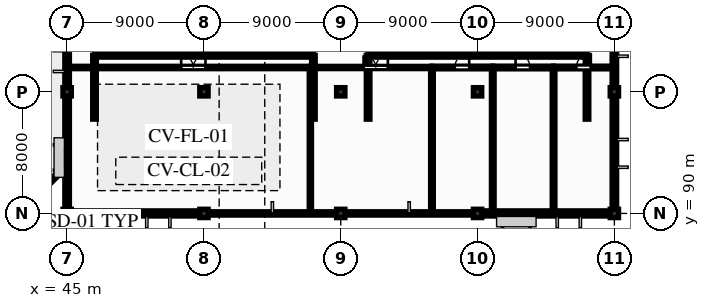
"""IFC4 building model, lengths in metres.
Left out: names, types, materials, properties, quantities, classifications, styles, units other than length and angle.
Written with IfcOpenShell. Run it as: python <this file> out.ifc"""

import sys

from ifc_helpers import new_model, si_unit, direction, frame, frame_2d, origin, origin_2d, place, context, subcontext, project, spatial, polyline, rectangle, outline, extrude, element, fill, save


model = new_model("IFC4")
c1 = context("Model", 3, precision=1e-05, world=origin(), true_north=direction((0.0, 1.0)))
c2 = subcontext(c1, "Body", "Model", "MODEL_VIEW")
j1 = project(units=[si_unit("LENGTHUNIT", "METRE"), si_unit("PLANEANGLEUNIT", "RADIAN")], contexts=[c1])
p1 = place(None, origin())
s1 = spatial("IfcSite", under=j1, at=p1, CompositionType="ELEMENT")
p2 = place(p1, origin())
s2 = spatial("IfcBuilding", under=s1, at=p2, CompositionType="ELEMENT")
p3 = place(p2, frame((0.0, 0.0, 20.26)))
s3 = spatial("IfcBuildingStorey", under=s2, at=p3, CompositionType="ELEMENT", Elevation=20.26)
for number, where, z_axis, x_axis in (
    (1, (45.0, 90.0, 0.0), (0.0, 0.0, 1.0), (1.0, 0.0, 0.0)),
    (2, (45.0, 98.0, 0.0), (0.0, 0.0, 1.0), (1.0, 0.0, 0.0)),
    (3, (54.0, 90.0, 0.0), (0.0, 0.0, 1.0), (1.0, 0.0, 0.0)),
    (4, (54.0, 98.0, 0.0), (0.0, 0.0, 1.0), (1.0, 0.0, 0.0)),
    (5, (63.0, 90.0, 0.0), (0.0, 0.0, 1.0), (1.0, 0.0, 0.0)),
    (6, (63.0, 98.0, 0.0), (0.0, 0.0, 1.0), (1.0, 0.0, 0.0)),
    (7, (72.0, 90.0, 0.0), (0.0, 0.0, 1.0), (1.0, 0.0, 0.0)),
    (8, (72.0, 98.0, 0.0), (0.0, 0.0, 1.0), (1.0, 0.0, 0.0)),
    (9, (81.0, 90.0, 0.0), (0.0, 0.0, 1.0), (1.0, 0.0, 0.0)),
    (10, (81.0, 98.0, 0.0), (0.0, 0.0, 1.0), (1.0, 0.0, 0.0)),
):
    element("IfcColumn", number, at=place(p3, frame(where, z_axis=z_axis, x_axis=x_axis)), inside=s3, PredefinedType="COLUMN", context=c2, shape_type="SweptSolid", body=[
        extrude(rectangle(XDim=0.55, YDim=0.55, at=origin_2d()), origin(), (0.0, 0.0, 1.0), 3.64),
    ])
p4 = place(p3, frame((45.0, 90.0, 0.0), z_axis=(0.0, 0.0, 1.0), x_axis=(1.0, 0.0, 0.0)))
e11 = element("IfcWall", 11, at=p4, inside=s3, PredefinedType="SOLIDWALL", context=c2, shape_type="SweptSolid", body=[
    extrude(rectangle(XDim=9.0, YDim=0.34, at=frame_2d((4.5, 0.0))), origin(), (0.0, 0.0, 1.0), 3.39),
])
p5 = place(p4, frame((1.8, 0.0, 0.545)))
e12 = element("IfcOpeningElement", 12, at=p5, cuts=e11, PredefinedType="OPENING", context=c2, shape_type="SweptSolid", body=[
    extrude(rectangle(XDim=1.5, YDim=2.1, at=frame_2d((0.75, 1.05))), frame((0.0, 0.18, 0.0), z_axis=(0.0, -1.0, 0.0), x_axis=(1.0, 0.0, 0.0)), (0.0, 0.0, 1.0), 0.36),
])
p6 = place(p4, frame((5.4, 0.0, 0.545)))
e13 = element("IfcOpeningElement", 13, at=p6, cuts=e11, PredefinedType="OPENING", context=c2, shape_type="SweptSolid", body=[
    extrude(rectangle(XDim=1.2, YDim=2.1, at=frame_2d((0.6, 1.05))), frame((0.0, 0.18, 0.0), z_axis=(0.0, -1.0, 0.0), x_axis=(1.0, 0.0, 0.0)), (0.0, 0.0, 1.0), 0.36),
])
p7 = place(p3, frame((72.0, 90.0, 0.0), z_axis=(0.0, 0.0, 1.0), x_axis=(1.0, 0.0, 0.0)))
e14 = element("IfcWall", 14, at=p7, inside=s3, PredefinedType="SOLIDWALL", context=c2, shape_type="SweptSolid", body=[
    extrude(rectangle(XDim=9.0, YDim=0.34, at=frame_2d((4.5, 0.0))), origin(), (0.0, 0.0, 1.0), 3.39),
])
p8 = place(p7, frame((1.8, 0.0, 0.545)))
e15 = element("IfcOpeningElement", 15, at=p8, cuts=e14, PredefinedType="OPENING", context=c2, shape_type="SweptSolid", body=[
    extrude(rectangle(XDim=1.5, YDim=2.1, at=frame_2d((0.75, 1.05))), frame((0.0, 0.18, 0.0), z_axis=(0.0, -1.0, 0.0), x_axis=(1.0, 0.0, 0.0)), (0.0, 0.0, 1.0), 0.36),
])
p9 = place(p7, frame((5.4, 0.0, 0.545)))
e16 = element("IfcOpeningElement", 16, at=p9, cuts=e14, PredefinedType="OPENING", context=c2, shape_type="SweptSolid", body=[
    extrude(rectangle(XDim=1.2, YDim=2.1, at=frame_2d((0.6, 1.05))), frame((0.0, 0.18, 0.0), z_axis=(0.0, -1.0, 0.0), x_axis=(1.0, 0.0, 0.0)), (0.0, 0.0, 1.0), 0.36),
])
p10 = place(p3, frame((45.0, 90.0, 0.0), z_axis=(0.0, 0.0, 1.0), x_axis=(0.0, 1.0, 0.0)))
e17 = element("IfcWall", 17, at=p10, inside=s3, PredefinedType="SOLIDWALL", context=c2, shape_type="SweptSolid", body=[
    extrude(rectangle(XDim=24.0, YDim=0.3, at=frame_2d((12.0, 0.0))), origin(), (0.0, 0.0, 1.0), 2.585),
])
p11 = place(p10, frame((3.0, 0.0, 0.615)))
e18 = element("IfcOpeningElement", 18, at=p11, cuts=e17, PredefinedType="OPENING", context=c2, shape_type="SweptSolid", body=[
    extrude(rectangle(XDim=1.35, YDim=1.85, at=frame_2d((0.675, 0.925))), frame((0.0, 0.16, 0.0), z_axis=(0.0, -1.0, 0.0), x_axis=(1.0, 0.0, 0.0)), (0.0, 0.0, 1.0), 0.32),
])
p12 = place(p10, frame((11.7, 0.0, 0.715)))
e19 = element("IfcOpeningElement", 19, at=p12, cuts=e17, PredefinedType="OPENING", context=c2, shape_type="SweptSolid", body=[
    extrude(rectangle(XDim=1.05, YDim=1.75, at=frame_2d((0.525, 0.875))), frame((0.0, 0.16, 0.0), z_axis=(0.0, -1.0, 0.0), x_axis=(1.0, 0.0, 0.0)), (0.0, 0.0, 1.0), 0.32),
])
p13 = place(p10, frame((16.5, 0.0, 0.365)))
e20 = element("IfcOpeningElement", 20, at=p13, cuts=e17, PredefinedType="OPENING", context=c2, shape_type="SweptSolid", body=[
    extrude(rectangle(XDim=1.5, YDim=2.1, at=frame_2d((0.75, 1.05))), frame((0.0, 0.16, 0.0), z_axis=(0.0, -1.0, 0.0), x_axis=(1.0, 0.0, 0.0)), (0.0, 0.0, 1.0), 0.32),
])
p14 = place(p3, frame((81.0, 90.0, 0.0), z_axis=(0.0, 0.0, 1.0), x_axis=(0.0, 1.0, 0.0)))
e21 = element("IfcWall", 21, at=p14, inside=s3, PredefinedType="SOLIDWALL", context=c2, shape_type="SweptSolid", body=[
    extrude(rectangle(XDim=24.0, YDim=0.3, at=frame_2d((12.0, 0.0))), origin(), (0.0, 0.0, 1.0), 2.585),
])
p15 = place(p14, frame((3.2, 0.0, 0.365)))
e22 = element("IfcOpeningElement", 22, at=p15, cuts=e21, PredefinedType="OPENING", context=c2, shape_type="SweptSolid", body=[
    extrude(rectangle(XDim=1.5, YDim=2.1, at=frame_2d((0.75, 1.05))), frame((0.0, 0.16, 0.0), z_axis=(0.0, -1.0, 0.0), x_axis=(1.0, 0.0, 0.0)), (0.0, 0.0, 1.0), 0.32),
])
p16 = place(p14, frame((10.5, 0.0, 0.615)))
e23 = element("IfcOpeningElement", 23, at=p16, cuts=e21, PredefinedType="OPENING", context=c2, shape_type="SweptSolid", body=[
    extrude(rectangle(XDim=1.35, YDim=1.85, at=frame_2d((0.675, 0.925))), frame((0.0, 0.16, 0.0), z_axis=(0.0, -1.0, 0.0), x_axis=(1.0, 0.0, 0.0)), (0.0, 0.0, 1.0), 0.32),
])
p17 = place(p3, frame((46.8, 100.4, 3.64), z_axis=(0.0, 0.0, 1.0), x_axis=(1.0, 0.0, 0.0)))
e24 = element("IfcWall", 24, at=p17, inside=s3, PredefinedType="SOLIDWALL", context=c2, shape_type="SweptSolid", body=[
    extrude(rectangle(XDim=14.4, YDim=0.24, at=frame_2d((7.2, 0.0))), origin(), (0.0, 0.0, 1.0), 0.92),
])
for number, where, z_axis, x_axis in (
    (25, (46.8, 96.2, 3.64), (0.0, 0.0, 1.0), (0.0, 1.0, 0.0)),
    (26, (61.2, 96.2, 3.64), (0.0, 0.0, 1.0), (0.0, 1.0, 0.0)),
):
    element("IfcWall", number, at=place(p3, frame(where, z_axis=z_axis, x_axis=x_axis)), inside=s3, PredefinedType="SOLIDWALL", context=c2, shape_type="SweptSolid", body=[
        extrude(outline(polyline([(0.0, 0.0), (4.2, 0.0), (4.2, 0.92), (0.0, 0.22), (0.0, 0.0)])), frame((0.0, 0.12, 0.0), z_axis=(0.0, -1.0, 0.0), x_axis=(1.0, 0.0, 0.0)), (0.0, 0.0, 1.0), 0.24),
    ])
p18 = place(p3, frame((64.8, 100.4, 3.64), z_axis=(0.0, 0.0, 1.0), x_axis=(1.0, 0.0, 0.0)))
e27 = element("IfcWall", 27, at=p18, inside=s3, PredefinedType="SOLIDWALL", context=c2, shape_type="SweptSolid", body=[
    extrude(rectangle(XDim=14.4, YDim=0.24, at=frame_2d((7.2, 0.0))), origin(), (0.0, 0.0, 1.0), 0.92),
])
for number, where, z_axis, x_axis in (
    (28, (64.8, 96.2, 3.64), (0.0, 0.0, 1.0), (0.0, 1.0, 0.0)),
    (29, (79.2, 96.2, 3.64), (0.0, 0.0, 1.0), (0.0, 1.0, 0.0)),
):
    element("IfcWall", number, at=place(p3, frame(where, z_axis=z_axis, x_axis=x_axis)), inside=s3, PredefinedType="SOLIDWALL", context=c2, shape_type="SweptSolid", body=[
        extrude(outline(polyline([(0.0, 0.0), (4.2, 0.0), (4.2, 0.92), (0.0, 0.22), (0.0, 0.0)])), frame((0.0, 0.12, 0.0), z_axis=(0.0, -1.0, 0.0), x_axis=(1.0, 0.0, 0.0)), (0.0, 0.0, 1.0), 0.24),
    ])
p19 = place(p3, frame((41.941, 90.141, 0.0), z_axis=(0.0, 0.0, 1.0), x_axis=(0.707106781187, 0.707106781187, 0.0)))
e30 = element("IfcWall", 30, at=p19, inside=s3, PredefinedType="PARAPET", context=c2, shape_type="SweptSolid", body=[
    extrude(rectangle(XDim=4.125, YDim=0.2, at=frame_2d((2.063, 0.0))), origin(), (0.0, 0.0, 1.0), 0.72),
])
p20 = place(p3, frame((45.22, 90.0, 3.64), z_axis=(0.0, 0.0, 1.0), x_axis=(1.0, 0.0, 0.0)))
e31 = element("IfcWall", 31, at=p20, inside=s3, PredefinedType="PARAPET", context=c2, shape_type="SweptSolid", body=[
    extrude(rectangle(XDim=35.56, YDim=0.22, at=frame_2d((17.78, 0.0))), origin(), (0.0, 0.0, 1.0), 0.42),
])
for number, where, z_axis, x_axis in (
    (32, (81.0, 90.22, 3.64), (0.0, 0.0, 1.0), (0.0, 1.0, 0.0)),
    (33, (45.0, 113.78, 3.64), (0.0, 0.0, 1.0), (0.0, -1.0, 0.0)),
):
    element("IfcWall", number, at=place(p3, frame(where, z_axis=z_axis, x_axis=x_axis)), inside=s3, PredefinedType="PARAPET", context=c2, shape_type="SweptSolid", body=[
        extrude(rectangle(XDim=23.56, YDim=0.22, at=frame_2d((11.78, 0.0))), origin(), (0.0, 0.0, 1.0), 0.42),
    ])
p21 = place(p3, frame((45.0, 99.6, 0.0), z_axis=(0.0, 0.0, 1.0), x_axis=(1.0, 0.0, 0.0)))
e34 = element("IfcWall", 34, at=p21, inside=s3, PredefinedType="PARTITIONING", context=c2, shape_type="SweptSolid", body=[
    extrude(rectangle(XDim=16.0, YDim=0.16, at=frame_2d((8.0, 0.0))), origin(), (0.0, 0.0, 1.0), 3.39),
])
p22 = place(p21, frame((7.5, 0.0, 0.0)))
e35 = element("IfcOpeningElement", 35, at=p22, cuts=e34, PredefinedType="OPENING", context=c2, shape_type="SweptSolid", body=[
    extrude(rectangle(XDim=1.6, YDim=2.2, at=frame_2d((0.8, 1.1))), frame((0.0, 0.09, 0.0), z_axis=(0.0, -1.0, 0.0), x_axis=(1.0, 0.0, 0.0)), (0.0, 0.0, 1.0), 0.18),
])
p23 = place(p3, frame((61.0, 99.6, 0.0), z_axis=(0.0, 0.0, 1.0), x_axis=(1.0, 0.0, 0.0)))
e36 = element("IfcWall", 36, at=p23, inside=s3, PredefinedType="PARTITIONING", context=c2, shape_type="SweptSolid", body=[
    extrude(rectangle(XDim=8.0, YDim=0.15, at=frame_2d((4.0, 0.0))), origin(), (0.0, 0.0, 1.0), 3.39),
])
p24 = place(p23, frame((3.5, 0.0, 0.0)))
e37 = element("IfcOpeningElement", 37, at=p24, cuts=e36, PredefinedType="OPENING", context=c2, shape_type="SweptSolid", body=[
    extrude(rectangle(XDim=1.6, YDim=2.2, at=frame_2d((0.8, 1.1))), frame((0.0, 0.085, 0.0), z_axis=(0.0, -1.0, 0.0), x_axis=(1.0, 0.0, 0.0)), (0.0, 0.0, 1.0), 0.17),
])
p25 = place(p3, frame((61.0, 90.0, 0.0), z_axis=(0.0, 0.0, 1.0), x_axis=(0.0, 1.0, 0.0)))
e38 = element("IfcWall", 38, at=p25, inside=s3, PredefinedType="PARTITIONING", context=c2, shape_type="SweptSolid", body=[
    extrude(rectangle(XDim=9.6, YDim=0.15, at=frame_2d((4.8, 0.0))), origin(), (0.0, 0.0, 1.0), 3.39),
])
p26 = place(p3, frame((69.0, 99.6, 0.0), z_axis=(0.0, 0.0, 1.0), x_axis=(1.0, 0.0, 0.0)))
e39 = element("IfcWall", 39, at=p26, inside=s3, PredefinedType="PLUMBINGWALL", context=c2, shape_type="SweptSolid", body=[
    extrude(rectangle(XDim=4.0, YDim=0.18, at=frame_2d((2.0, 0.0))), origin(), (0.0, 0.0, 1.0), 3.39),
])
p27 = place(p26, frame((1.5, 0.0, 0.0)))
e40 = element("IfcOpeningElement", 40, at=p27, cuts=e39, PredefinedType="OPENING", context=c2, shape_type="SweptSolid", body=[
    extrude(rectangle(XDim=0.95, YDim=2.15, at=frame_2d((0.475, 1.075))), frame((0.0, 0.1, 0.0), z_axis=(0.0, -1.0, 0.0), x_axis=(1.0, 0.0, 0.0)), (0.0, 0.0, 1.0), 0.2),
])
p28 = place(p3, frame((69.0, 90.0, 0.0), z_axis=(0.0, 0.0, 1.0), x_axis=(0.0, 1.0, 0.0)))
e41 = element("IfcWall", 41, at=p28, inside=s3, PredefinedType="PLUMBINGWALL", context=c2, shape_type="SweptSolid", body=[
    extrude(rectangle(XDim=9.6, YDim=0.18, at=frame_2d((4.8, 0.0))), origin(), (0.0, 0.0, 1.0), 3.39),
])
p29 = place(p3, frame((73.0, 99.6, 0.0), z_axis=(0.0, 0.0, 1.0), x_axis=(1.0, 0.0, 0.0)))
e42 = element("IfcWall", 42, at=p29, inside=s3, PredefinedType="PLUMBINGWALL", context=c2, shape_type="SweptSolid", body=[
    extrude(rectangle(XDim=4.0, YDim=0.18, at=frame_2d((2.0, 0.0))), origin(), (0.0, 0.0, 1.0), 3.39),
])
p30 = place(p29, frame((1.5, 0.0, 0.0)))
e43 = element("IfcOpeningElement", 43, at=p30, cuts=e42, PredefinedType="OPENING", context=c2, shape_type="SweptSolid", body=[
    extrude(rectangle(XDim=0.95, YDim=2.15, at=frame_2d((0.475, 1.075))), frame((0.0, 0.1, 0.0), z_axis=(0.0, -1.0, 0.0), x_axis=(1.0, 0.0, 0.0)), (0.0, 0.0, 1.0), 0.2),
])
p31 = place(p3, frame((73.0, 90.0, 0.0), z_axis=(0.0, 0.0, 1.0), x_axis=(0.0, 1.0, 0.0)))
e44 = element("IfcWall", 44, at=p31, inside=s3, PredefinedType="PLUMBINGWALL", context=c2, shape_type="SweptSolid", body=[
    extrude(rectangle(XDim=9.6, YDim=0.18, at=frame_2d((4.8, 0.0))), origin(), (0.0, 0.0, 1.0), 3.39),
])
p32 = place(p3, frame((77.0, 99.6, 0.0), z_axis=(0.0, 0.0, 1.0), x_axis=(1.0, 0.0, 0.0)))
e45 = element("IfcWall", 45, at=p32, inside=s3, PredefinedType="PLUMBINGWALL", context=c2, shape_type="SweptSolid", body=[
    extrude(rectangle(XDim=4.0, YDim=0.18, at=frame_2d((2.0, 0.0))), origin(), (0.0, 0.0, 1.0), 3.39),
])
p33 = place(p32, frame((1.5, 0.0, 0.0)))
e46 = element("IfcOpeningElement", 46, at=p33, cuts=e45, PredefinedType="OPENING", context=c2, shape_type="SweptSolid", body=[
    extrude(rectangle(XDim=0.95, YDim=2.15, at=frame_2d((0.475, 1.075))), frame((0.0, 0.1, 0.0), z_axis=(0.0, -1.0, 0.0), x_axis=(1.0, 0.0, 0.0)), (0.0, 0.0, 1.0), 0.2),
])
p34 = place(p3, frame((77.0, 90.0, 0.0), z_axis=(0.0, 0.0, 1.0), x_axis=(0.0, 1.0, 0.0)))
e47 = element("IfcWall", 47, at=p34, inside=s3, PredefinedType="PLUMBINGWALL", context=c2, shape_type="SweptSolid", body=[
    extrude(rectangle(XDim=9.6, YDim=0.18, at=frame_2d((4.8, 0.0))), origin(), (0.0, 0.0, 1.0), 3.39),
])
p35 = place(p5, origin())
e48 = element("IfcWindow", 48, at=p35, inside=s3, PartitioningType="SINGLE_PANEL", PredefinedType="WINDOW", context=c2, shape_type="SweptSolid", body=[
    extrude(rectangle(XDim=1.5, YDim=2.1, at=frame_2d((0.75, 1.05))), frame((0.0, 0.03, 0.0), z_axis=(0.0, -1.0, 0.0), x_axis=(1.0, 0.0, 0.0)), (0.0, 0.0, 1.0), 0.06),
])
fill(e12, e48)
p36 = place(p6, origin())
e49 = element("IfcWindow", 49, at=p36, inside=s3, PartitioningType="SINGLE_PANEL", PredefinedType="WINDOW", context=c2, shape_type="SweptSolid", body=[
    extrude(rectangle(XDim=1.2, YDim=2.1, at=frame_2d((0.6, 1.05))), frame((0.0, 0.03, 0.0), z_axis=(0.0, -1.0, 0.0), x_axis=(1.0, 0.0, 0.0)), (0.0, 0.0, 1.0), 0.06),
])
fill(e13, e49)
p37 = place(p8, origin())
e50 = element("IfcWindow", 50, at=p37, inside=s3, PartitioningType="SINGLE_PANEL", PredefinedType="WINDOW", context=c2, shape_type="SweptSolid", body=[
    extrude(rectangle(XDim=1.5, YDim=2.1, at=frame_2d((0.75, 1.05))), frame((0.0, 0.03, 0.0), z_axis=(0.0, -1.0, 0.0), x_axis=(1.0, 0.0, 0.0)), (0.0, 0.0, 1.0), 0.06),
])
fill(e15, e50)
p38 = place(p9, origin())
e51 = element("IfcWindow", 51, at=p38, inside=s3, PartitioningType="SINGLE_PANEL", PredefinedType="WINDOW", context=c2, shape_type="SweptSolid", body=[
    extrude(rectangle(XDim=1.2, YDim=2.1, at=frame_2d((0.6, 1.05))), frame((0.0, 0.03, 0.0), z_axis=(0.0, -1.0, 0.0), x_axis=(1.0, 0.0, 0.0)), (0.0, 0.0, 1.0), 0.06),
])
fill(e16, e51)
p39 = place(p11, origin())
e52 = element("IfcWindow", 52, at=p39, inside=s3, PartitioningType="SINGLE_PANEL", PredefinedType="WINDOW", context=c2, shape_type="SweptSolid", body=[
    extrude(rectangle(XDim=1.35, YDim=1.85, at=frame_2d((0.675, 0.925))), frame((0.0, 0.03, 0.0), z_axis=(0.0, -1.0, 0.0), x_axis=(1.0, 0.0, 0.0)), (0.0, 0.0, 1.0), 0.06),
])
fill(e18, e52)
p40 = place(p15, origin())
e53 = element("IfcWindow", 53, at=p40, inside=s3, PartitioningType="SINGLE_PANEL", PredefinedType="WINDOW", context=c2, shape_type="SweptSolid", body=[
    extrude(rectangle(XDim=1.5, YDim=2.1, at=frame_2d((0.75, 1.05))), frame((0.0, 0.03, 0.0), z_axis=(0.0, -1.0, 0.0), x_axis=(1.0, 0.0, 0.0)), (0.0, 0.0, 1.0), 0.06),
])
fill(e22, e53)
p41 = place(p16, origin())
e54 = element("IfcWindow", 54, at=p41, inside=s3, PartitioningType="SINGLE_PANEL", PredefinedType="WINDOW", context=c2, shape_type="SweptSolid", body=[
    extrude(rectangle(XDim=1.35, YDim=1.85, at=frame_2d((0.675, 0.925))), frame((0.0, 0.03, 0.0), z_axis=(0.0, -1.0, 0.0), x_axis=(1.0, 0.0, 0.0)), (0.0, 0.0, 1.0), 0.06),
])
fill(e23, e54)
p42 = place(p22, origin())
e55 = element("IfcDoor", 55, at=p42, inside=s3, OperationType="DOUBLE_DOOR_SINGLE_SWING", PredefinedType="DOOR", context=c2, shape_type="SweptSolid", body=[
    extrude(rectangle(XDim=1.6, YDim=2.2, at=frame_2d((0.8, 1.1))), frame((0.0, 0.025, 0.0), z_axis=(0.0, -1.0, 0.0), x_axis=(1.0, 0.0, 0.0)), (0.0, 0.0, 1.0), 0.05),
])
fill(e35, e55)
p43 = place(p24, origin())
e56 = element("IfcDoor", 56, at=p43, inside=s3, OperationType="DOUBLE_DOOR_SINGLE_SWING", PredefinedType="DOOR", context=c2, shape_type="SweptSolid", body=[
    extrude(rectangle(XDim=1.6, YDim=2.2, at=frame_2d((0.8, 1.1))), frame((0.0, 0.025, 0.0), z_axis=(0.0, -1.0, 0.0), x_axis=(1.0, 0.0, 0.0)), (0.0, 0.0, 1.0), 0.05),
])
fill(e37, e56)
p44 = place(p27, origin())
e57 = element("IfcDoor", 57, at=p44, inside=s3, OperationType="SINGLE_SWING_RIGHT", PredefinedType="DOOR", context=c2, shape_type="SweptSolid", body=[
    extrude(rectangle(XDim=0.95, YDim=2.15, at=frame_2d((0.475, 1.075))), frame((0.0, 0.025, 0.0), z_axis=(0.0, -1.0, 0.0), x_axis=(1.0, 0.0, 0.0)), (0.0, 0.0, 1.0), 0.05),
])
fill(e40, e57)
p45 = place(p30, origin())
e58 = element("IfcDoor", 58, at=p45, inside=s3, OperationType="SINGLE_SWING_LEFT", PredefinedType="DOOR", context=c2, shape_type="SweptSolid", body=[
    extrude(rectangle(XDim=0.95, YDim=2.15, at=frame_2d((0.475, 1.075))), frame((0.0, 0.025, 0.0), z_axis=(0.0, -1.0, 0.0), x_axis=(1.0, 0.0, 0.0)), (0.0, 0.0, 1.0), 0.05),
])
fill(e43, e58)
p46 = place(p33, origin())
e59 = element("IfcDoor", 59, at=p46, inside=s3, OperationType="SINGLE_SWING_RIGHT", PredefinedType="DOOR", context=c2, shape_type="SweptSolid", body=[
    extrude(rectangle(XDim=0.95, YDim=2.15, at=frame_2d((0.475, 1.075))), frame((0.0, 0.025, 0.0), z_axis=(0.0, -1.0, 0.0), x_axis=(1.0, 0.0, 0.0)), (0.0, 0.0, 1.0), 0.05),
])
fill(e46, e59)
save(model, sys.argv[1])
